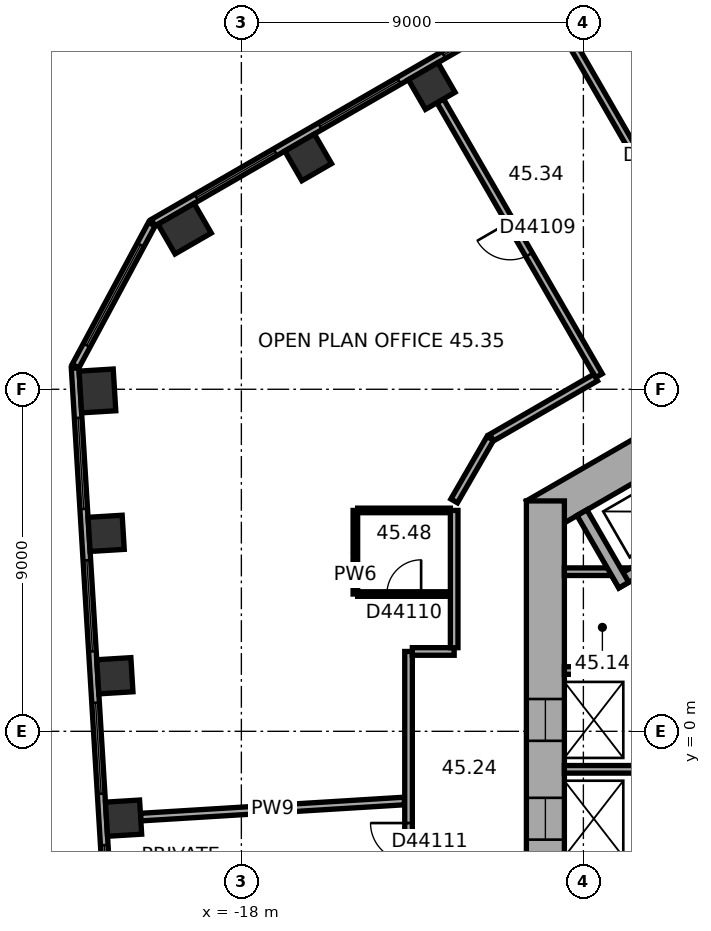
"""IFC4 building model, lengths in metres.
Left out: names, types, materials, properties, quantities, classifications, styles, units other than length and angle.
Written with IfcOpenShell. Run it as: python <this file> out.ifc"""

import sys

from ifc_helpers import new_model, si_unit, direction, frame, frame_2d, origin, origin_2d, place, context, subcontext, project, spatial, rectangle, extrude, element, fill, save


model = new_model("IFC4")
c1 = context("Model", 3, precision=1e-05, world=origin(), true_north=direction((0.0, 1.0)))
c2 = subcontext(c1, "Body", "Model", "MODEL_VIEW")
j1 = project(units=[si_unit("LENGTHUNIT", "METRE"), si_unit("PLANEANGLEUNIT", "RADIAN")], contexts=[c1])
p1 = place(None, origin())
s1 = spatial("IfcSite", under=j1, at=p1, CompositionType="ELEMENT")
p2 = place(p1, origin())
s2 = spatial("IfcBuilding", under=s1, at=p2, CompositionType="ELEMENT")
p3 = place(p2, frame((0.0, 0.0, 183.6)))
s3 = spatial("IfcBuildingStorey", under=s2, at=p3, CompositionType="ELEMENT", Elevation=183.6)
for number, where, z_axis, x_axis in (
    (1, (-12.991, 16.979, 0.0), (0.0, 0.0, 1.0), (-0.866, -0.5, 0.0)),
    (2, (-16.242, 15.102, 0.0), (0.0, 0.0, 1.0), (-0.866, -0.5, 0.0)),
):
    element("IfcColumn", number, at=place(p3, frame(where, z_axis=z_axis, x_axis=x_axis)), inside=s3, PredefinedType="COLUMN", context=c2, shape_type="SweptSolid", body=[
        extrude(rectangle(XDim=0.9, YDim=0.9, at=origin_2d()), origin(), (0.0, 0.0, 1.0), 3.7),
    ])
for number, where, z_axis, x_axis in (
    (3, (-19.494, 13.225, 0.0), (0.0, 0.0, 1.0), (-0.866, -0.5, 0.0)),
    (4, (-21.787, 8.956, 0.0), (0.0, 0.0, 1.0), (0.061, -0.998, 0.0)),
):
    element("IfcColumn", number, at=place(p3, frame(where, z_axis=z_axis, x_axis=x_axis)), inside=s3, PredefinedType="COLUMN", context=c2, shape_type="SweptSolid", body=[
        extrude(rectangle(XDim=1.1, YDim=0.9, at=origin_2d()), origin(), (0.0, 0.0, 1.0), 3.7),
    ])
for number, where, z_axis, x_axis in (
    (5, (-21.558, 5.209, 0.0), (0.0, 0.0, 1.0), (0.061, -0.998, 0.0)),
    (6, (-21.329, 1.462, 0.0), (0.0, 0.0, 1.0), (0.061, -0.998, 0.0)),
    (7, (-21.1, -2.285, 0.0), (0.0, 0.0, 1.0), (0.061, -0.998, 0.0)),
):
    element("IfcColumn", number, at=place(p3, frame(where, z_axis=z_axis, x_axis=x_axis)), inside=s3, PredefinedType="COLUMN", context=c2, shape_type="SweptSolid", body=[
        extrude(rectangle(XDim=0.9, YDim=0.9, at=origin_2d()), origin(), (0.0, 0.0, 1.0), 3.7),
    ])
p4 = place(p3, frame((0.25, 11.691, 0.0), z_axis=(0.0, 0.0, 1.0), x_axis=(-0.866022616891, -0.50000482701, 0.0)))
e8 = element("IfcWall", 8, at=p4, inside=s3, PredefinedType="SHEAR", context=c2, shape_type="SweptSolid", body=[
    extrude(rectangle(XDim=12.125, YDim=1.0, at=frame_2d((6.062, 0.0))), origin(), (0.0, 0.0, 1.0), 3.7),
])
p5 = place(p4, frame((6.262, 0.0, 0.0)))
e9 = element("IfcOpeningElement", 9, at=p5, cuts=e8, PredefinedType="OPENING", context=c2, shape_type="SweptSolid", body=[
    extrude(rectangle(XDim=1.5, YDim=2.1, at=frame_2d((0.75, 1.05))), frame((0.0, 0.51, 0.0), z_axis=(0.0, -1.0, 0.0), x_axis=(1.0, 0.0, 0.0)), (0.0, 0.0, 1.0), 1.02),
])
p6 = place(p4, frame((1.812, 0.0, 0.0)))
e10 = element("IfcOpeningElement", 10, at=p6, cuts=e8, PredefinedType="OPENING", context=c2, shape_type="SweptSolid", body=[
    extrude(rectangle(XDim=0.9, YDim=2.1, at=frame_2d((0.45, 1.05))), frame((0.0, 0.51, 0.0), z_axis=(0.0, -1.0, 0.0), x_axis=(1.0, 0.0, 0.0)), (0.0, 0.0, 1.0), 1.02),
])
p7 = place(p4, frame((4.412, 0.0, 0.0)))
e11 = element("IfcOpeningElement", 11, at=p7, cuts=e8, PredefinedType="OPENING", context=c2, shape_type="SweptSolid", body=[
    extrude(rectangle(XDim=0.9, YDim=2.1, at=frame_2d((0.45, 1.05))), frame((0.0, 0.51, 0.0), z_axis=(0.0, -1.0, 0.0), x_axis=(1.0, 0.0, 0.0)), (0.0, 0.0, 1.0), 1.02),
])
p8 = place(p3, frame((-10.0, 6.062, 0.0), z_axis=(0.0, 0.0, 1.0), x_axis=(0.0, -1.0, 0.0)))
e12 = element("IfcWall", 12, at=p8, inside=s3, PredefinedType="SHEAR", context=c2, shape_type="SweptSolid", body=[
    extrude(rectangle(XDim=12.125, YDim=1.0, at=frame_2d((6.062, 0.0))), origin(), (0.0, 0.0, 1.0), 3.7),
])
p9 = place(p8, frame((5.212, 0.0, 0.0)))
e13 = element("IfcOpeningElement", 13, at=p9, cuts=e12, PredefinedType="OPENING", context=c2, shape_type="SweptSolid", body=[
    extrude(rectangle(XDim=1.1, YDim=2.1, at=frame_2d((0.55, 1.05))), frame((0.0, 0.51, 0.0), z_axis=(0.0, -1.0, 0.0), x_axis=(1.0, 0.0, 0.0)), (0.0, 0.0, 1.0), 1.02),
])
p10 = place(p8, frame((7.812, 0.0, 0.0)))
e14 = element("IfcOpeningElement", 14, at=p10, cuts=e12, PredefinedType="OPENING", context=c2, shape_type="SweptSolid", body=[
    extrude(rectangle(XDim=1.1, YDim=2.1, at=frame_2d((0.55, 1.05))), frame((0.0, 0.51, 0.0), z_axis=(0.0, -1.0, 0.0), x_axis=(1.0, 0.0, 0.0)), (0.0, 0.0, 1.0), 1.02),
])
p11 = place(p3, frame((-2.961, 23.405, 0.0), z_axis=(0.0, 0.0, 1.0), x_axis=(-0.866023315909, -0.500003616288, 0.0)))
e15 = element("IfcWall", 15, at=p11, inside=s3, PredefinedType="STANDARD", context=c2, shape_type="SweptSolid", body=[
    extrude(rectangle(XDim=20.044, YDim=0.2, at=frame_2d((10.022, 0.0))), origin(), (0.0, 0.0, 1.0), 3.7),
])
p12 = place(p11, frame((1.314, 0.0, 0.9)))
e16 = element("IfcOpeningElement", 16, at=p12, cuts=e15, PredefinedType="OPENING", context=c2, shape_type="SweptSolid", body=[
    extrude(rectangle(XDim=2.4, YDim=2.0, at=frame_2d((1.2, 1.0))), frame((0.0, 0.11, 0.0), z_axis=(0.0, -1.0, 0.0), x_axis=(1.0, 0.0, 0.0)), (0.0, 0.0, 1.0), 0.22),
])
p13 = place(p11, frame((5.069, 0.0, 0.9)))
e17 = element("IfcOpeningElement", 17, at=p13, cuts=e15, PredefinedType="OPENING", context=c2, shape_type="SweptSolid", body=[
    extrude(rectangle(XDim=2.4, YDim=2.0, at=frame_2d((1.2, 1.0))), frame((0.0, 0.11, 0.0), z_axis=(0.0, -1.0, 0.0), x_axis=(1.0, 0.0, 0.0)), (0.0, 0.0, 1.0), 0.22),
])
p14 = place(p11, frame((8.823, 0.0, 0.9)))
e18 = element("IfcOpeningElement", 18, at=p14, cuts=e15, PredefinedType="OPENING", context=c2, shape_type="SweptSolid", body=[
    extrude(rectangle(XDim=2.4, YDim=2.0, at=frame_2d((1.2, 1.0))), frame((0.0, 0.11, 0.0), z_axis=(0.0, -1.0, 0.0), x_axis=(1.0, 0.0, 0.0)), (0.0, 0.0, 1.0), 0.22),
])
p15 = place(p11, frame((12.577, 0.0, 0.9)))
e19 = element("IfcOpeningElement", 19, at=p15, cuts=e15, PredefinedType="OPENING", context=c2, shape_type="SweptSolid", body=[
    extrude(rectangle(XDim=2.4, YDim=2.0, at=frame_2d((1.2, 1.0))), frame((0.0, 0.11, 0.0), z_axis=(0.0, -1.0, 0.0), x_axis=(1.0, 0.0, 0.0)), (0.0, 0.0, 1.0), 0.22),
])
p16 = place(p11, frame((16.331, 0.0, 0.9)))
e20 = element("IfcOpeningElement", 20, at=p16, cuts=e15, PredefinedType="OPENING", context=c2, shape_type="SweptSolid", body=[
    extrude(rectangle(XDim=2.4, YDim=2.0, at=frame_2d((1.2, 1.0))), frame((0.0, 0.11, 0.0), z_axis=(0.0, -1.0, 0.0), x_axis=(1.0, 0.0, 0.0)), (0.0, 0.0, 1.0), 0.22),
])
p17 = place(p3, frame((-20.357, 13.344, 0.0), z_axis=(0.0, 0.0, 1.0), x_axis=(-0.473288913494, -0.880907262068, 0.0)))
e21 = element("IfcWall", 21, at=p17, inside=s3, PredefinedType="STANDARD", context=c2, shape_type="SweptSolid", body=[
    extrude(rectangle(XDim=4.238, YDim=0.2, at=frame_2d((2.119, 0.0))), origin(), (0.0, 0.0, 1.0), 3.7),
])
p18 = place(p17, frame((0.619, 0.0, 0.9)))
e22 = element("IfcOpeningElement", 22, at=p18, cuts=e21, PredefinedType="OPENING", context=c2, shape_type="SweptSolid", body=[
    extrude(rectangle(XDim=3.0, YDim=2.0, at=frame_2d((1.5, 1.0))), frame((0.0, 0.11, 0.0), z_axis=(0.0, -1.0, 0.0), x_axis=(1.0, 0.0, 0.0)), (0.0, 0.0, 1.0), 0.22),
])
p19 = place(p3, frame((-22.375, 9.557, 0.0), z_axis=(0.0, 0.0, 1.0), x_axis=(0.061036015339, -0.998135564356, 0.0)))
e23 = element("IfcWall", 23, at=p19, inside=s3, PredefinedType="STANDARD", context=c2, shape_type="SweptSolid", body=[
    extrude(rectangle(XDim=20.044, YDim=0.2, at=frame_2d((10.022, 0.0))), origin(), (0.0, 0.0, 1.0), 3.7),
])
p20 = place(p19, frame((1.313, 0.0, 0.9)))
e24 = element("IfcOpeningElement", 24, at=p20, cuts=e23, PredefinedType="OPENING", context=c2, shape_type="SweptSolid", body=[
    extrude(rectangle(XDim=2.4, YDim=2.0, at=frame_2d((1.2, 1.0))), frame((0.0, 0.11, 0.0), z_axis=(0.0, -1.0, 0.0), x_axis=(1.0, 0.0, 0.0)), (0.0, 0.0, 1.0), 0.22),
])
p21 = place(p19, frame((5.067, 0.0, 0.9)))
e25 = element("IfcOpeningElement", 25, at=p21, cuts=e23, PredefinedType="OPENING", context=c2, shape_type="SweptSolid", body=[
    extrude(rectangle(XDim=2.4, YDim=2.0, at=frame_2d((1.2, 1.0))), frame((0.0, 0.11, 0.0), z_axis=(0.0, -1.0, 0.0), x_axis=(1.0, 0.0, 0.0)), (0.0, 0.0, 1.0), 0.22),
])
p22 = place(p19, frame((8.821, 0.0, 0.9)))
e26 = element("IfcOpeningElement", 26, at=p22, cuts=e23, PredefinedType="OPENING", context=c2, shape_type="SweptSolid", body=[
    extrude(rectangle(XDim=2.4, YDim=2.0, at=frame_2d((1.2, 1.0))), frame((0.0, 0.11, 0.0), z_axis=(0.0, -1.0, 0.0), x_axis=(1.0, 0.0, 0.0)), (0.0, 0.0, 1.0), 0.22),
])
p23 = place(p19, frame((12.575, 0.0, 0.9)))
e27 = element("IfcOpeningElement", 27, at=p23, cuts=e23, PredefinedType="OPENING", context=c2, shape_type="SweptSolid", body=[
    extrude(rectangle(XDim=2.4, YDim=2.0, at=frame_2d((1.2, 1.0))), frame((0.0, 0.11, 0.0), z_axis=(0.0, -1.0, 0.0), x_axis=(1.0, 0.0, 0.0)), (0.0, 0.0, 1.0), 0.22),
])
p24 = place(p19, frame((16.329, 0.0, 0.9)))
e28 = element("IfcOpeningElement", 28, at=p24, cuts=e23, PredefinedType="OPENING", context=c2, shape_type="SweptSolid", body=[
    extrude(rectangle(XDim=2.4, YDim=2.0, at=frame_2d((1.2, 1.0))), frame((0.0, 0.11, 0.0), z_axis=(0.0, -1.0, 0.0), x_axis=(1.0, 0.0, 0.0)), (0.0, 0.0, 1.0), 0.22),
])
for number, where, z_axis, x_axis in (
    (29, (-7.3, 4.2, 0.0), (0.0, 0.0, 1.0), (-1.0, 0.0, 0.0)),
    (30, (-7.3, 1.6, 0.0), (0.0, 0.0, 1.0), (-1.0, 0.0, 0.0)),
    (31, (-7.3, -1.0, 0.0), (0.0, 0.0, 1.0), (-1.0, 0.0, 0.0)),
):
    element("IfcWall", number, at=place(p3, frame(where, z_axis=z_axis, x_axis=x_axis)), inside=s3, PredefinedType="PARTITIONING", context=c2, shape_type="SweptSolid", body=[
        extrude(rectangle(XDim=2.2, YDim=0.2, at=frame_2d((1.1, 0.0))), origin(), (0.0, 0.0, 1.0), 3.42),
    ])
p25 = place(p3, frame((-5.24, 5.577, 0.0), z_axis=(0.0, 0.0, 1.0), x_axis=(-0.866014461049, -0.500018952895, 0.0)))
e32 = element("IfcWall", 32, at=p25, inside=s3, PredefinedType="SHEAR", context=c2, shape_type="SweptSolid", body=[
    extrude(rectangle(XDim=3.35, YDim=0.3, at=frame_2d((1.675, 0.0))), origin(), (0.0, 0.0, 1.0), 3.42),
])
p26 = place(p3, frame((-7.937, 3.847, 0.0), z_axis=(0.0, 0.0, 1.0), x_axis=(-0.50002983664, 0.866008176907, 0.0)))
e33 = element("IfcWall", 33, at=p26, inside=s3, PredefinedType="SHEAR", context=c2, shape_type="SweptSolid", body=[
    extrude(rectangle(XDim=2.2, YDim=0.3, at=frame_2d((1.1, 0.0))), origin(), (0.0, 0.0, 1.0), 3.42),
])
p27 = place(p3, frame((-20.651, -2.258, 0.0), z_axis=(0.0, 0.0, 1.0), x_axis=(0.998133960965, 0.061062230286, 0.0)))
e34 = element("IfcWall", 34, at=p27, inside=s3, PredefinedType="PARTITIONING", context=c2, shape_type="SweptSolid", body=[
    extrude(rectangle(XDim=6.953, YDim=0.2, at=frame_2d((3.477, 0.0))), origin(), (0.0, 0.0, 1.0), 3.42),
])
p28 = place(p3, frame((-15.0, 3.612, 0.0), z_axis=(0.0, 0.0, 1.0), x_axis=(0.0, 1.0, 0.0)))
e35 = element("IfcWall", 35, at=p28, inside=s3, PredefinedType="PARTITIONING", context=c2, shape_type="SweptSolid", body=[
    extrude(rectangle(XDim=2.2, YDim=0.12, at=frame_2d((1.1, 0.0))), origin(), (0.0, 0.0, 1.0), 3.42),
])
p29 = place(p3, frame((-14.94, 5.812, 0.0), z_axis=(0.0, 0.0, 1.0), x_axis=(1.0, 0.0, 0.0)))
e36 = element("IfcWall", 36, at=p29, inside=s3, PredefinedType="PARTITIONING", context=c2, shape_type="SweptSolid", body=[
    extrude(rectangle(XDim=2.44, YDim=0.12, at=frame_2d((1.22, 0.0))), origin(), (0.0, 0.0, 1.0), 3.42),
])
p30 = place(p3, frame((-13.601, 2.101, 0.0), z_axis=(0.0, 0.0, 1.0), x_axis=(0.0, -1.0, 0.0)))
e37 = element("IfcWall", 37, at=p30, inside=s3, PredefinedType="PARTITIONING", context=c2, shape_type="SweptSolid", body=[
    extrude(rectangle(XDim=6.102, YDim=0.2, at=frame_2d((3.051, 0.0))), origin(), (0.0, 0.0, 1.0), 3.42),
])
p31 = place(p30, frame((4.515, 0.0, 0.0)))
e38 = element("IfcOpeningElement", 38, at=p31, cuts=e37, PredefinedType="OPENING", context=c2, shape_type="SweptSolid", body=[
    extrude(rectangle(XDim=1.0, YDim=2.1, at=frame_2d((0.5, 1.05))), frame((0.0, 0.11, 0.0), z_axis=(0.0, -1.0, 0.0), x_axis=(1.0, 0.0, 0.0)), (0.0, 0.0, 1.0), 0.22),
])
p32 = place(p3, frame((-12.766, 16.589, 0.0), z_axis=(0.0, 0.0, 1.0), x_axis=(0.500010139422, -0.866019549707, 0.0)))
e39 = element("IfcWall", 39, at=p32, inside=s3, PredefinedType="PARTITIONING", context=c2, shape_type="SweptSolid", body=[
    extrude(rectangle(XDim=8.35, YDim=0.2, at=frame_2d((4.175, 0.0))), origin(), (0.0, 0.0, 1.0), 3.42),
])
p33 = place(p32, frame((3.675, 0.0, 0.0)))
e40 = element("IfcOpeningElement", 40, at=p33, cuts=e39, PredefinedType="OPENING", context=c2, shape_type="SweptSolid", body=[
    extrude(rectangle(XDim=1.0, YDim=2.1, at=frame_2d((0.5, 1.05))), frame((0.0, 0.11, 0.0), z_axis=(0.0, -1.0, 0.0), x_axis=(1.0, 0.0, 0.0)), (0.0, 0.0, 1.0), 0.22),
])
p34 = place(p3, frame((-12.5, 3.612, 0.0), z_axis=(0.0, 0.0, 1.0), x_axis=(-1.0, 0.0, 0.0)))
e41 = element("IfcWall", 41, at=p34, inside=s3, PredefinedType="PARTITIONING", context=c2, shape_type="SweptSolid", body=[
    extrude(rectangle(XDim=2.44, YDim=0.12, at=frame_2d((1.22, 0.0))), origin(), (0.0, 0.0, 1.0), 3.42),
])
p35 = place(p34, frame((0.77, 0.0, 0.0)))
e42 = element("IfcOpeningElement", 42, at=p35, cuts=e41, PredefinedType="OPENING", context=c2, shape_type="SweptSolid", body=[
    extrude(rectangle(XDim=0.9, YDim=2.1, at=frame_2d((0.45, 1.05))), frame((0.0, 0.07, 0.0), z_axis=(0.0, -1.0, 0.0), x_axis=(1.0, 0.0, 0.0)), (0.0, 0.0, 1.0), 0.14),
])
p36 = place(p3, frame((-12.4, 2.101, 0.0), z_axis=(0.0, 0.0, 1.0), x_axis=(-1.0, 0.0, 0.0)))
e43 = element("IfcWall", 43, at=p36, inside=s3, PredefinedType="PARTITIONING", context=c2, shape_type="SweptSolid", body=[
    extrude(rectangle(XDim=1.101, YDim=0.2, at=frame_2d((0.551, 0.0))), origin(), (0.0, 0.0, 1.0), 3.42),
])
p37 = place(p3, frame((-12.4, 5.812, 0.0), z_axis=(0.0, 0.0, 1.0), x_axis=(0.0, -1.0, 0.0)))
e44 = element("IfcWall", 44, at=p37, inside=s3, PredefinedType="PARTITIONING", context=c2, shape_type="SweptSolid", body=[
    extrude(rectangle(XDim=3.611, YDim=0.2, at=frame_2d((1.806, 0.0))), origin(), (0.0, 0.0, 1.0), 3.42),
])
p38 = place(p3, frame((-11.45, 7.708, 0.0), z_axis=(0.0, 0.0, 1.0), x_axis=(-0.500022797313, -0.86601224135, 0.0)))
e45 = element("IfcWall", 45, at=p38, inside=s3, PredefinedType="PARTITIONING", context=c2, shape_type="SweptSolid", body=[
    extrude(rectangle(XDim=1.9, YDim=0.2, at=frame_2d((0.95, 0.0))), origin(), (0.0, 0.0, 1.0), 3.42),
])
p39 = place(p3, frame((-9.515, 18.466, 0.0), z_axis=(0.0, 0.0, 1.0), x_axis=(0.500010139422, -0.866019549707, 0.0)))
e46 = element("IfcWall", 46, at=p39, inside=s3, PredefinedType="PARTITIONING", context=c2, shape_type="SweptSolid", body=[
    extrude(rectangle(XDim=8.35, YDim=0.2, at=frame_2d((4.175, 0.0))), origin(), (0.0, 0.0, 1.0), 2.87),
])
p40 = place(p39, frame((3.675, 0.0, 0.0)))
e47 = element("IfcOpeningElement", 47, at=p40, cuts=e46, PredefinedType="OPENING", context=c2, shape_type="SweptSolid", body=[
    extrude(rectangle(XDim=1.0, YDim=2.1, at=frame_2d((0.5, 1.05))), frame((0.0, 0.11, 0.0), z_axis=(0.0, -1.0, 0.0), x_axis=(1.0, 0.0, 0.0)), (0.0, 0.0, 1.0), 0.22),
])
p41 = place(p3, frame((-8.678, 9.308, 0.0), z_axis=(0.0, 0.0, 1.0), x_axis=(-0.866000359435, -0.500043375578, 0.0)))
e48 = element("IfcWall", 48, at=p41, inside=s3, PredefinedType="PARTITIONING", context=c2, shape_type="SweptSolid", body=[
    extrude(rectangle(XDim=3.161, YDim=0.2, at=frame_2d((1.581, 0.0))), origin(), (0.0, 0.0, 1.0), 3.42),
])
p42 = place(p14, origin())
e49 = element("IfcWindow", 49, at=p42, inside=s3, PartitioningType="SINGLE_PANEL", PredefinedType="WINDOW", context=c2, shape_type="SweptSolid", body=[
    extrude(rectangle(XDim=2.4, YDim=2.0, at=frame_2d((1.2, 1.0))), frame((0.0, 0.03, 0.0), z_axis=(0.0, -1.0, 0.0), x_axis=(1.0, 0.0, 0.0)), (0.0, 0.0, 1.0), 0.06),
])
fill(e18, e49)
p43 = place(p15, origin())
e50 = element("IfcWindow", 50, at=p43, inside=s3, PartitioningType="SINGLE_PANEL", PredefinedType="WINDOW", context=c2, shape_type="SweptSolid", body=[
    extrude(rectangle(XDim=2.4, YDim=2.0, at=frame_2d((1.2, 1.0))), frame((0.0, 0.03, 0.0), z_axis=(0.0, -1.0, 0.0), x_axis=(1.0, 0.0, 0.0)), (0.0, 0.0, 1.0), 0.06),
])
fill(e19, e50)
p44 = place(p16, origin())
e51 = element("IfcWindow", 51, at=p44, inside=s3, PartitioningType="SINGLE_PANEL", PredefinedType="WINDOW", context=c2, shape_type="SweptSolid", body=[
    extrude(rectangle(XDim=2.4, YDim=2.0, at=frame_2d((1.2, 1.0))), frame((0.0, 0.03, 0.0), z_axis=(0.0, -1.0, 0.0), x_axis=(1.0, 0.0, 0.0)), (0.0, 0.0, 1.0), 0.06),
])
fill(e20, e51)
p45 = place(p18, origin())
e52 = element("IfcWindow", 52, at=p45, inside=s3, PartitioningType="SINGLE_PANEL", PredefinedType="WINDOW", context=c2, shape_type="SweptSolid", body=[
    extrude(rectangle(XDim=3.0, YDim=2.0, at=frame_2d((1.5, 1.0))), frame((0.0, 0.03, 0.0), z_axis=(0.0, -1.0, 0.0), x_axis=(1.0, 0.0, 0.0)), (0.0, 0.0, 1.0), 0.06),
])
fill(e22, e52)
p46 = place(p20, origin())
e53 = element("IfcWindow", 53, at=p46, inside=s3, PartitioningType="SINGLE_PANEL", PredefinedType="WINDOW", context=c2, shape_type="SweptSolid", body=[
    extrude(rectangle(XDim=2.4, YDim=2.0, at=frame_2d((1.2, 1.0))), frame((0.0, 0.03, 0.0), z_axis=(0.0, -1.0, 0.0), x_axis=(1.0, 0.0, 0.0)), (0.0, 0.0, 1.0), 0.06),
])
fill(e24, e53)
p47 = place(p21, origin())
e54 = element("IfcWindow", 54, at=p47, inside=s3, PartitioningType="SINGLE_PANEL", PredefinedType="WINDOW", context=c2, shape_type="SweptSolid", body=[
    extrude(rectangle(XDim=2.4, YDim=2.0, at=frame_2d((1.2, 1.0))), frame((0.0, 0.03, 0.0), z_axis=(0.0, -1.0, 0.0), x_axis=(1.0, 0.0, 0.0)), (0.0, 0.0, 1.0), 0.06),
])
fill(e25, e54)
p48 = place(p22, origin())
e55 = element("IfcWindow", 55, at=p48, inside=s3, PartitioningType="SINGLE_PANEL", PredefinedType="WINDOW", context=c2, shape_type="SweptSolid", body=[
    extrude(rectangle(XDim=2.4, YDim=2.0, at=frame_2d((1.2, 1.0))), frame((0.0, 0.03, 0.0), z_axis=(0.0, -1.0, 0.0), x_axis=(1.0, 0.0, 0.0)), (0.0, 0.0, 1.0), 0.06),
])
fill(e26, e55)
p49 = place(p23, origin())
e56 = element("IfcWindow", 56, at=p49, inside=s3, PartitioningType="SINGLE_PANEL", PredefinedType="WINDOW", context=c2, shape_type="SweptSolid", body=[
    extrude(rectangle(XDim=2.4, YDim=2.0, at=frame_2d((1.2, 1.0))), frame((0.0, 0.03, 0.0), z_axis=(0.0, -1.0, 0.0), x_axis=(1.0, 0.0, 0.0)), (0.0, 0.0, 1.0), 0.06),
])
fill(e27, e56)
p50 = place(p9, origin())
e57 = element("IfcDoor", 57, at=p50, inside=s3, OperationType="DOUBLE_DOOR_SLIDING", PredefinedType="DOOR", context=c2, shape_type="SweptSolid", body=[
    extrude(rectangle(XDim=1.1, YDim=2.1, at=frame_2d((0.55, 1.05))), frame((0.0, 0.025, 0.0), z_axis=(0.0, -1.0, 0.0), x_axis=(1.0, 0.0, 0.0)), (0.0, 0.0, 1.0), 0.05),
])
fill(e13, e57)
p51 = place(p10, origin())
e58 = element("IfcDoor", 58, at=p51, inside=s3, OperationType="DOUBLE_DOOR_SLIDING", PredefinedType="DOOR", context=c2, shape_type="SweptSolid", body=[
    extrude(rectangle(XDim=1.1, YDim=2.1, at=frame_2d((0.55, 1.05))), frame((0.0, 0.025, 0.0), z_axis=(0.0, -1.0, 0.0), x_axis=(1.0, 0.0, 0.0)), (0.0, 0.0, 1.0), 0.05),
])
fill(e14, e58)
p52 = place(p33, origin())
e59 = element("IfcDoor", 59, at=p52, inside=s3, OperationType="SINGLE_SWING_LEFT", PredefinedType="DOOR", context=c2, shape_type="SweptSolid", body=[
    extrude(rectangle(XDim=1.0, YDim=2.1, at=frame_2d((0.5, 1.05))), frame((0.0, 0.025, 0.0), z_axis=(0.0, -1.0, 0.0), x_axis=(1.0, 0.0, 0.0)), (0.0, 0.0, 1.0), 0.05),
])
fill(e40, e59)
p53 = place(p35, origin())
e60 = element("IfcDoor", 60, at=p53, inside=s3, OperationType="SINGLE_SWING_LEFT", PredefinedType="DOOR", context=c2, shape_type="SweptSolid", body=[
    extrude(rectangle(XDim=0.9, YDim=2.1, at=frame_2d((0.45, 1.05))), frame((0.0, 0.025, 0.0), z_axis=(0.0, -1.0, 0.0), x_axis=(1.0, 0.0, 0.0)), (0.0, 0.0, 1.0), 0.05),
])
fill(e42, e60)
p54 = place(p31, origin())
e61 = element("IfcDoor", 61, at=p54, inside=s3, OperationType="SINGLE_SWING_LEFT", PredefinedType="DOOR", context=c2, shape_type="SweptSolid", body=[
    extrude(rectangle(XDim=1.0, YDim=2.1, at=frame_2d((0.5, 1.05))), frame((0.0, 0.025, 0.0), z_axis=(0.0, -1.0, 0.0), x_axis=(1.0, 0.0, 0.0)), (0.0, 0.0, 1.0), 0.05),
])
fill(e38, e61)
save(model, sys.argv[1])
